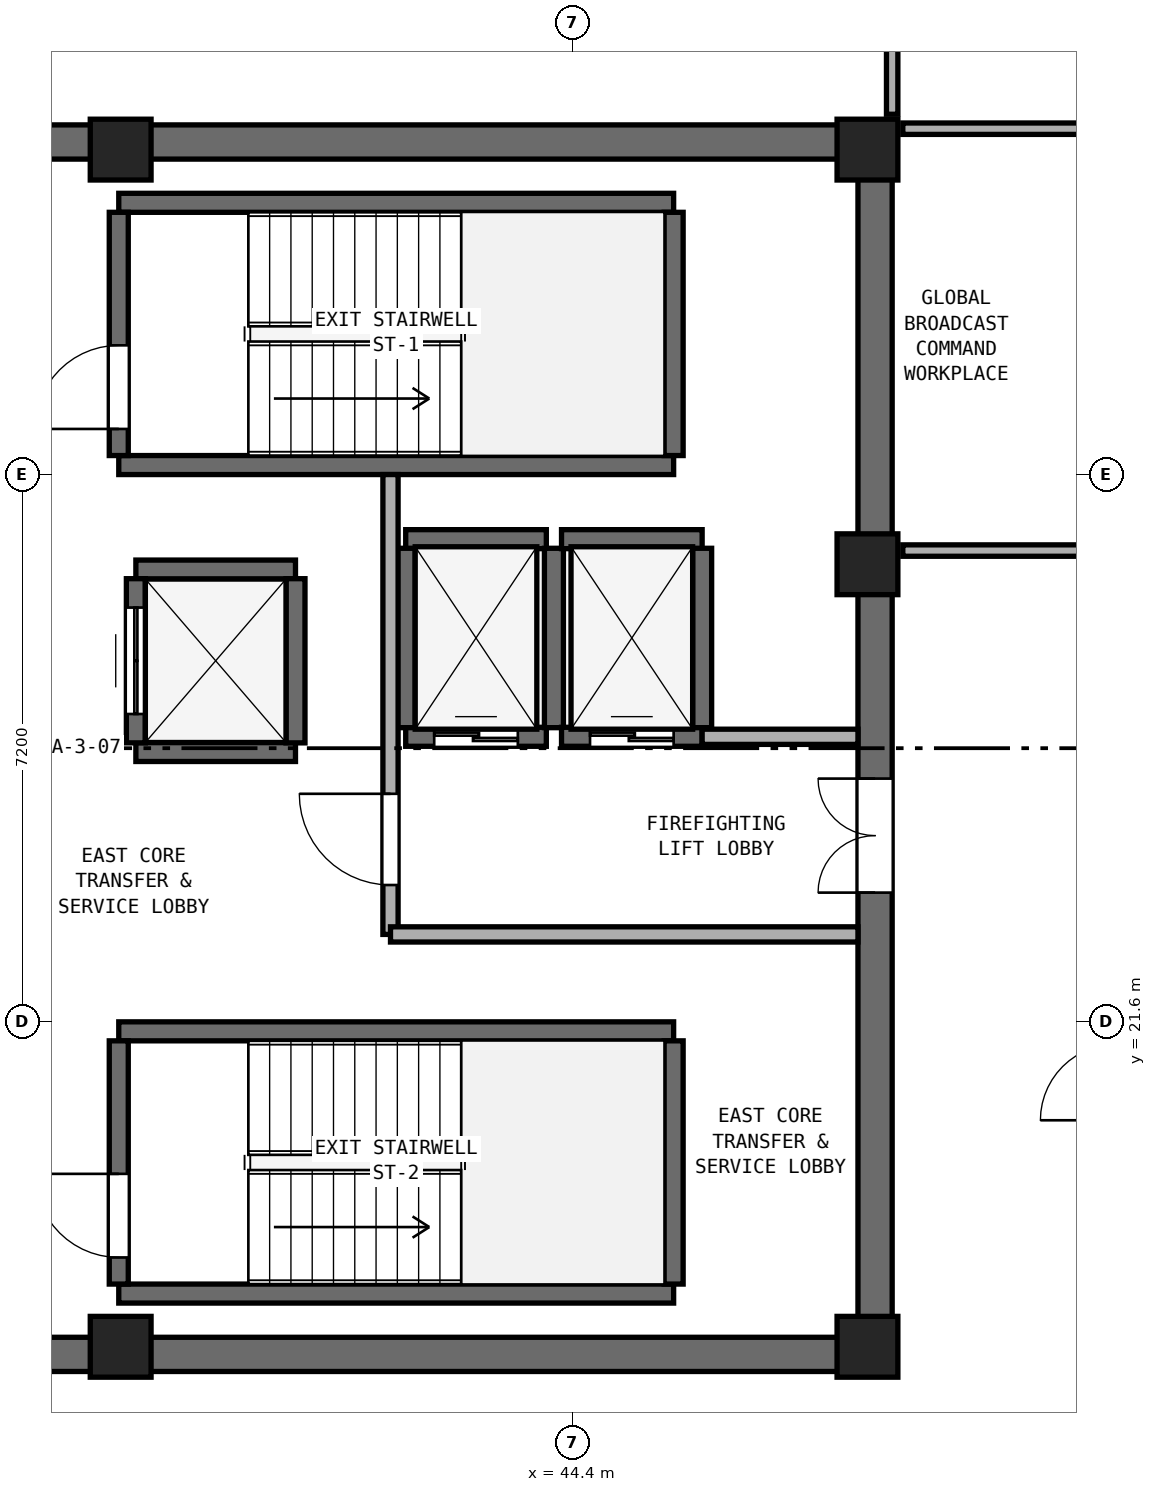
"""IFC4 building model, lengths in metres.
Left out: names, types, materials, properties, quantities, classifications, styles, units other than length and angle.
Written with IfcOpenShell. Run it as: python <this file> out.ifc"""

import sys

from ifc_helpers import new_model, si_unit, direction, frame, frame_2d, origin, origin_2d, place, context, subcontext, project, spatial, rectangle, extrude, element, fill, save


model = new_model("IFC4")
c1 = context("Model", 3, precision=1e-05, world=origin(), true_north=direction((0.0, 1.0)))
c2 = subcontext(c1, "Body", "Model", "MODEL_VIEW")
j1 = project(units=[si_unit("LENGTHUNIT", "METRE"), si_unit("PLANEANGLEUNIT", "RADIAN")], contexts=[c1])
p1 = place(None, origin())
s1 = spatial("IfcSite", under=j1, at=p1, CompositionType="ELEMENT")
p2 = place(p1, origin())
s2 = spatial("IfcBuilding", under=s1, at=p2, CompositionType="ELEMENT")
p3 = place(p2, frame((0.0, 0.0, 247.8)))
s3 = spatial("IfcBuildingStorey", under=s2, at=p3, CompositionType="ELEMENT", Elevation=247.8)
for number, where, z_axis, x_axis in (
    (1, (25.4, 17.225, 0.0), (0.0, 0.0, 1.0), (1.0, 0.0, 0.0)),
    (2, (25.4, 33.175, 0.0), (0.0, 0.0, 1.0), (1.0, 0.0, 0.0)),
):
    element("IfcWall", number, at=place(p3, frame(where, z_axis=z_axis, x_axis=x_axis)), inside=s3, PredefinedType="SHEAR", context=c2, shape_type="SweptSolid", body=[
        extrude(rectangle(XDim=23.2, YDim=0.45, at=frame_2d((11.6, 0.0))), origin(), (0.0, 0.0, 1.0), 3.51),
    ])
p4 = place(p3, frame((48.375, 17.45, 0.0), z_axis=(0.0, 0.0, 1.0), x_axis=(0.0, 1.0, 0.0)))
e3 = element("IfcWall", 3, at=p4, inside=s3, PredefinedType="SHEAR", context=c2, shape_type="SweptSolid", body=[
    extrude(rectangle(XDim=15.5, YDim=0.45, at=frame_2d((7.75, 0.0))), origin(), (0.0, 0.0, 1.0), 3.51),
])
p5 = place(p4, frame((5.85, 0.0, 0.0)))
e4 = element("IfcOpeningElement", 4, at=p5, cuts=e3, PredefinedType="OPENING", context=c2, shape_type="SweptSolid", body=[
    extrude(rectangle(XDim=1.5, YDim=2.15, at=frame_2d((0.75, 1.075))), frame((0.0, 0.235, 0.0), z_axis=(0.0, -1.0, 0.0), x_axis=(1.0, 0.0, 0.0)), (0.0, 0.0, 1.0), 0.47),
])
for number, where, z_axis, x_axis in (
    (5, (38.45, 17.325, 0.0), (0.0, 0.0, 1.0), (1.0, 0.0, 0.0)),
    (6, (48.275, 17.325, 0.0), (0.0, 0.0, 1.0), (1.0, 0.0, 0.0)),
    (7, (48.275, 27.62, 0.0), (0.0, 0.0, 1.0), (1.0, 0.0, 0.0)),
    (8, (48.275, 33.075, 0.0), (0.0, 0.0, 1.0), (1.0, 0.0, 0.0)),
    (9, (38.45, 33.075, 0.0), (0.0, 0.0, 1.0), (1.0, 0.0, 0.0)),
):
    element("IfcColumn", number, at=place(p3, frame(where, z_axis=z_axis, x_axis=x_axis)), inside=s3, PredefinedType="PILASTER", context=c2, shape_type="SweptSolid", body=[
        extrude(rectangle(XDim=0.8, YDim=0.8, at=origin_2d()), origin(), (0.0, 0.0, 1.0), 3.8),
    ])
for number, where, z_axis, x_axis in (
    (10, (38.425, 28.925, 0.0), (0.0, 0.0, 1.0), (1.0, 0.0, 0.0)),
    (11, (38.425, 32.375, 0.0), (0.0, 0.0, 1.0), (1.0, 0.0, 0.0)),
):
    element("IfcWall", number, at=place(p3, frame(where, z_axis=z_axis, x_axis=x_axis)), inside=s3, PredefinedType="SHEAR", context=c2, shape_type="SweptSolid", body=[
        extrude(rectangle(XDim=7.3, YDim=0.25, at=frame_2d((3.65, 0.0))), origin(), (0.0, 0.0, 1.0), 3.51),
    ])
p6 = place(p3, frame((38.425, 29.05, 0.0), z_axis=(0.0, 0.0, 1.0), x_axis=(0.0, 1.0, 0.0)))
e12 = element("IfcWall", 12, at=p6, inside=s3, PredefinedType="SHEAR", context=c2, shape_type="SweptSolid", body=[
    extrude(rectangle(XDim=3.2, YDim=0.25, at=frame_2d((1.6, 0.0))), origin(), (0.0, 0.0, 1.0), 3.51),
])
p7 = place(p6, frame((0.35, 0.0, 0.0)))
e13 = element("IfcOpeningElement", 13, at=p7, cuts=e12, PredefinedType="OPENING", context=c2, shape_type="SweptSolid", body=[
    extrude(rectangle(XDim=1.1, YDim=2.15, at=frame_2d((0.55, 1.075))), frame((0.0, 0.135, 0.0), z_axis=(0.0, -1.0, 0.0), x_axis=(1.0, 0.0, 0.0)), (0.0, 0.0, 1.0), 0.27),
])
p8 = place(p3, frame((45.725, 29.05, 0.0), z_axis=(0.0, 0.0, 1.0), x_axis=(0.0, 1.0, 0.0)))
e14 = element("IfcWall", 14, at=p8, inside=s3, PredefinedType="SHEAR", context=c2, shape_type="SweptSolid", body=[
    extrude(rectangle(XDim=3.2, YDim=0.25, at=frame_2d((1.6, 0.0))), origin(), (0.0, 0.0, 1.0), 3.51),
])
for number, where, z_axis, x_axis in (
    (15, (38.425, 18.025, 0.0), (0.0, 0.0, 1.0), (1.0, 0.0, 0.0)),
    (16, (38.425, 21.475, 0.0), (0.0, 0.0, 1.0), (1.0, 0.0, 0.0)),
):
    element("IfcWall", number, at=place(p3, frame(where, z_axis=z_axis, x_axis=x_axis)), inside=s3, PredefinedType="SHEAR", context=c2, shape_type="SweptSolid", body=[
        extrude(rectangle(XDim=7.3, YDim=0.25, at=frame_2d((3.65, 0.0))), origin(), (0.0, 0.0, 1.0), 3.51),
    ])
p9 = place(p3, frame((38.425, 18.15, 0.0), z_axis=(0.0, 0.0, 1.0), x_axis=(0.0, 1.0, 0.0)))
e17 = element("IfcWall", 17, at=p9, inside=s3, PredefinedType="SHEAR", context=c2, shape_type="SweptSolid", body=[
    extrude(rectangle(XDim=3.2, YDim=0.25, at=frame_2d((1.6, 0.0))), origin(), (0.0, 0.0, 1.0), 3.51),
])
p10 = place(p9, frame((0.35, 0.0, 0.0)))
e18 = element("IfcOpeningElement", 18, at=p10, cuts=e17, PredefinedType="OPENING", context=c2, shape_type="SweptSolid", body=[
    extrude(rectangle(XDim=1.1, YDim=2.15, at=frame_2d((0.55, 1.075))), frame((0.0, 0.135, 0.0), z_axis=(0.0, -1.0, 0.0), x_axis=(1.0, 0.0, 0.0)), (0.0, 0.0, 1.0), 0.27),
])
p11 = place(p3, frame((45.725, 18.15, 0.0), z_axis=(0.0, 0.0, 1.0), x_axis=(0.0, 1.0, 0.0)))
e19 = element("IfcWall", 19, at=p11, inside=s3, PredefinedType="SHEAR", context=c2, shape_type="SweptSolid", body=[
    extrude(rectangle(XDim=3.2, YDim=0.25, at=frame_2d((1.6, 0.0))), origin(), (0.0, 0.0, 1.0), 3.51),
])
p12 = place(p3, frame((42.2, 25.35, 0.0), z_axis=(0.0, 0.0, 1.0), x_axis=(1.0, 0.0, 0.0)))
e20 = element("IfcWall", 20, at=p12, inside=s3, PredefinedType="SHEAR", context=c2, shape_type="SweptSolid", body=[
    extrude(rectangle(XDim=1.85, YDim=0.25, at=frame_2d((0.925, 0.0))), origin(), (0.0, 0.0, 1.0), 3.51),
])
p13 = place(p12, frame((0.375, 0.0, 0.0)))
e21 = element("IfcOpeningElement", 21, at=p13, cuts=e20, PredefinedType="OPENING", context=c2, shape_type="SweptSolid", body=[
    extrude(rectangle(XDim=1.1, YDim=2.15, at=frame_2d((0.55, 1.075))), frame((0.0, 0.135, 0.0), z_axis=(0.0, -1.0, 0.0), x_axis=(1.0, 0.0, 0.0)), (0.0, 0.0, 1.0), 0.27),
])
p14 = place(p3, frame((42.2, 27.95, 0.0), z_axis=(0.0, 0.0, 1.0), x_axis=(1.0, 0.0, 0.0)))
e22 = element("IfcWall", 22, at=p14, inside=s3, PredefinedType="SHEAR", context=c2, shape_type="SweptSolid", body=[
    extrude(rectangle(XDim=1.85, YDim=0.25, at=frame_2d((0.925, 0.0))), origin(), (0.0, 0.0, 1.0), 3.51),
])
for number, where, z_axis, x_axis in (
    (23, (42.2, 25.47, 0.0), (0.0, 0.0, 1.0), (0.0, 1.0, 0.0)),
    (24, (44.15, 25.47, 0.0), (0.0, 0.0, 1.0), (0.0, 1.0, 0.0)),
):
    element("IfcWall", number, at=place(p3, frame(where, z_axis=z_axis, x_axis=x_axis)), inside=s3, PredefinedType="SHEAR", context=c2, shape_type="SweptSolid", body=[
        extrude(rectangle(XDim=2.36, YDim=0.25, at=frame_2d((1.18, 0.0))), origin(), (0.0, 0.0, 1.0), 3.51),
    ])
p15 = place(p3, frame((44.25, 25.35, 0.0), z_axis=(0.0, 0.0, 1.0), x_axis=(1.0, 0.0, 0.0)))
e25 = element("IfcWall", 25, at=p15, inside=s3, PredefinedType="SHEAR", context=c2, shape_type="SweptSolid", body=[
    extrude(rectangle(XDim=1.85, YDim=0.25, at=frame_2d((0.925, 0.0))), origin(), (0.0, 0.0, 1.0), 3.51),
])
p16 = place(p15, frame((0.375, 0.0, 0.0)))
e26 = element("IfcOpeningElement", 26, at=p16, cuts=e25, PredefinedType="OPENING", context=c2, shape_type="SweptSolid", body=[
    extrude(rectangle(XDim=1.1, YDim=2.15, at=frame_2d((0.55, 1.075))), frame((0.0, 0.135, 0.0), z_axis=(0.0, -1.0, 0.0), x_axis=(1.0, 0.0, 0.0)), (0.0, 0.0, 1.0), 0.27),
])
p17 = place(p3, frame((44.25, 27.95, 0.0), z_axis=(0.0, 0.0, 1.0), x_axis=(1.0, 0.0, 0.0)))
e27 = element("IfcWall", 27, at=p17, inside=s3, PredefinedType="SHEAR", context=c2, shape_type="SweptSolid", body=[
    extrude(rectangle(XDim=1.85, YDim=0.25, at=frame_2d((0.925, 0.0))), origin(), (0.0, 0.0, 1.0), 3.51),
])
p18 = place(p3, frame((46.1, 25.47, 0.0), z_axis=(0.0, 0.0, 1.0), x_axis=(0.0, 1.0, 0.0)))
e28 = element("IfcWall", 28, at=p18, inside=s3, PredefinedType="SHEAR", context=c2, shape_type="SweptSolid", body=[
    extrude(rectangle(XDim=2.36, YDim=0.25, at=frame_2d((1.18, 0.0))), origin(), (0.0, 0.0, 1.0), 3.51),
])
for number, where, z_axis, x_axis in (
    (29, (38.65, 25.15, 0.0), (0.0, 0.0, 1.0), (1.0, 0.0, 0.0)),
    (30, (38.65, 27.55, 0.0), (0.0, 0.0, 1.0), (1.0, 0.0, 0.0)),
):
    element("IfcWall", number, at=place(p3, frame(where, z_axis=z_axis, x_axis=x_axis)), inside=s3, PredefinedType="SHEAR", context=c2, shape_type="SweptSolid", body=[
        extrude(rectangle(XDim=2.1, YDim=0.25, at=frame_2d((1.05, 0.0))), origin(), (0.0, 0.0, 1.0), 3.51),
    ])
p19 = place(p3, frame((38.65, 25.27, 0.0), z_axis=(0.0, 0.0, 1.0), x_axis=(0.0, 1.0, 0.0)))
e31 = element("IfcWall", 31, at=p19, inside=s3, PredefinedType="SHEAR", context=c2, shape_type="SweptSolid", body=[
    extrude(rectangle(XDim=2.16, YDim=0.25, at=frame_2d((1.08, 0.0))), origin(), (0.0, 0.0, 1.0), 3.51),
])
p20 = place(p19, frame((0.38, 0.0, 0.0)))
e32 = element("IfcOpeningElement", 32, at=p20, cuts=e31, PredefinedType="OPENING", context=c2, shape_type="SweptSolid", body=[
    extrude(rectangle(XDim=1.4, YDim=2.2, at=frame_2d((0.7, 1.1))), frame((0.0, 0.135, 0.0), z_axis=(0.0, -1.0, 0.0), x_axis=(1.0, 0.0, 0.0)), (0.0, 0.0, 1.0), 0.27),
])
p21 = place(p3, frame((40.75, 25.27, 0.0), z_axis=(0.0, 0.0, 1.0), x_axis=(0.0, 1.0, 0.0)))
e33 = element("IfcWall", 33, at=p21, inside=s3, PredefinedType="SHEAR", context=c2, shape_type="SweptSolid", body=[
    extrude(rectangle(XDim=2.16, YDim=0.25, at=frame_2d((1.08, 0.0))), origin(), (0.0, 0.0, 1.0), 3.51),
])
p22 = place(p3, frame((42.0, 22.75, 0.0), z_axis=(0.0, 0.0, 1.0), x_axis=(0.0, 1.0, 0.0)))
e34 = element("IfcWall", 34, at=p22, inside=s3, PredefinedType="SOLIDWALL", context=c2, shape_type="SweptSolid", body=[
    extrude(rectangle(XDim=6.05, YDim=0.2, at=frame_2d((3.025, 0.0))), origin(), (0.0, 0.0, 1.0), 3.51),
])
p23 = place(p22, frame((0.65, 0.0, 0.0)))
e35 = element("IfcOpeningElement", 35, at=p23, cuts=e34, PredefinedType="OPENING", context=c2, shape_type="SweptSolid", body=[
    extrude(rectangle(XDim=1.2, YDim=2.15, at=frame_2d((0.6, 1.075))), frame((0.0, 0.11, 0.0), z_axis=(0.0, -1.0, 0.0), x_axis=(1.0, 0.0, 0.0)), (0.0, 0.0, 1.0), 0.22),
])
p24 = place(p3, frame((42.0, 22.75, 0.0), z_axis=(0.0, 0.0, 1.0), x_axis=(1.0, 0.0, 0.0)))
e36 = element("IfcWall", 36, at=p24, inside=s3, PredefinedType="SOLIDWALL", context=c2, shape_type="SweptSolid", body=[
    extrude(rectangle(XDim=6.15, YDim=0.2, at=frame_2d((3.075, 0.0))), origin(), (0.0, 0.0, 1.0), 3.51),
])
p25 = place(p3, frame((46.1, 25.35, 0.0), z_axis=(0.0, 0.0, 1.0), x_axis=(1.0, 0.0, 0.0)))
e37 = element("IfcWall", 37, at=p25, inside=s3, PredefinedType="SOLIDWALL", context=c2, shape_type="SweptSolid", body=[
    extrude(rectangle(XDim=2.05, YDim=0.2, at=frame_2d((1.025, 0.0))), origin(), (0.0, 0.0, 1.0), 3.51),
])
p26 = place(p3, frame((48.6, 33.54, 0.0), z_axis=(0.0, 0.0, 1.0), x_axis=(0.0, 1.0, 0.0)))
e38 = element("IfcWall", 38, at=p26, inside=s3, PredefinedType="PARTITIONING", context=c2, shape_type="SweptSolid", body=[
    extrude(rectangle(XDim=2.81, YDim=0.15, at=frame_2d((1.405, 0.0))), origin(), (0.0, 0.0, 1.0), 2.893),
])
p27 = place(p3, frame((48.74, 27.8, 0.0), z_axis=(0.0, 0.0, 1.0), x_axis=(1.0, 0.0, 0.0)))
e39 = element("IfcWall", 39, at=p27, inside=s3, PredefinedType="PARTITIONING", context=c2, shape_type="SweptSolid", body=[
    extrude(rectangle(XDim=2.81, YDim=0.15, at=frame_2d((1.405, 0.0))), origin(), (0.0, 0.0, 1.0), 3.51),
])
p28 = place(p3, frame((48.74, 33.35, 0.0), z_axis=(0.0, 0.0, 1.0), x_axis=(1.0, 0.0, 0.0)))
e40 = element("IfcWall", 40, at=p28, inside=s3, PredefinedType="PARTITIONING", context=c2, shape_type="SweptSolid", body=[
    extrude(rectangle(XDim=2.81, YDim=0.15, at=frame_2d((1.405, 0.0))), origin(), (0.0, 0.0, 1.0), 2.893),
])
p29 = place(p7, origin())
e41 = element("IfcDoor", 41, at=p29, inside=s3, OperationType="SINGLE_SWING_LEFT", PredefinedType="DOOR", context=c2, shape_type="SweptSolid", body=[
    extrude(rectangle(XDim=1.1, YDim=2.15, at=frame_2d((0.55, 1.075))), frame((0.0, 0.025, 0.0), z_axis=(0.0, -1.0, 0.0), x_axis=(1.0, 0.0, 0.0)), (0.0, 0.0, 1.0), 0.05),
])
fill(e13, e41)
p30 = place(p10, origin())
e42 = element("IfcDoor", 42, at=p30, inside=s3, OperationType="SINGLE_SWING_RIGHT", PredefinedType="DOOR", context=c2, shape_type="SweptSolid", body=[
    extrude(rectangle(XDim=1.1, YDim=2.15, at=frame_2d((0.55, 1.075))), frame((0.0, 0.025, 0.0), z_axis=(0.0, -1.0, 0.0), x_axis=(1.0, 0.0, 0.0)), (0.0, 0.0, 1.0), 0.05),
])
fill(e18, e42)
p31 = place(p13, origin())
e43 = element("IfcDoor", 43, at=p31, inside=s3, OperationType="DOUBLE_DOOR_SLIDING", PredefinedType="DOOR", context=c2, shape_type="SweptSolid", body=[
    extrude(rectangle(XDim=1.1, YDim=2.15, at=frame_2d((0.55, 1.075))), frame((0.0, 0.025, 0.0), z_axis=(0.0, -1.0, 0.0), x_axis=(1.0, 0.0, 0.0)), (0.0, 0.0, 1.0), 0.05),
])
fill(e21, e43)
p32 = place(p16, origin())
e44 = element("IfcDoor", 44, at=p32, inside=s3, OperationType="DOUBLE_DOOR_SLIDING", PredefinedType="DOOR", context=c2, shape_type="SweptSolid", body=[
    extrude(rectangle(XDim=1.1, YDim=2.15, at=frame_2d((0.55, 1.075))), frame((0.0, 0.025, 0.0), z_axis=(0.0, -1.0, 0.0), x_axis=(1.0, 0.0, 0.0)), (0.0, 0.0, 1.0), 0.05),
])
fill(e26, e44)
p33 = place(p20, origin())
e45 = element("IfcDoor", 45, at=p33, inside=s3, OperationType="DOUBLE_DOOR_SLIDING", PredefinedType="DOOR", context=c2, shape_type="SweptSolid", body=[
    extrude(rectangle(XDim=1.4, YDim=2.2, at=frame_2d((0.7, 1.1))), frame((0.0, 0.025, 0.0), z_axis=(0.0, -1.0, 0.0), x_axis=(1.0, 0.0, 0.0)), (0.0, 0.0, 1.0), 0.05),
])
fill(e32, e45)
p34 = place(p23, origin())
e46 = element("IfcDoor", 46, at=p34, inside=s3, OperationType="SINGLE_SWING_RIGHT", PredefinedType="DOOR", context=c2, shape_type="SweptSolid", body=[
    extrude(rectangle(XDim=1.2, YDim=2.15, at=frame_2d((0.6, 1.075))), frame((0.0, 0.025, 0.0), z_axis=(0.0, -1.0, 0.0), x_axis=(1.0, 0.0, 0.0)), (0.0, 0.0, 1.0), 0.05),
])
fill(e35, e46)
p35 = place(p5, origin())
e47 = element("IfcDoor", 47, at=p35, inside=s3, OperationType="DOUBLE_DOOR_SINGLE_SWING", PredefinedType="DOOR", context=c2, shape_type="SweptSolid", body=[
    extrude(rectangle(XDim=1.5, YDim=2.15, at=frame_2d((0.75, 1.075))), frame((0.0, 0.025, 0.0), z_axis=(0.0, -1.0, 0.0), x_axis=(1.0, 0.0, 0.0)), (0.0, 0.0, 1.0), 0.05),
])
fill(e4, e47)
save(model, sys.argv[1])
